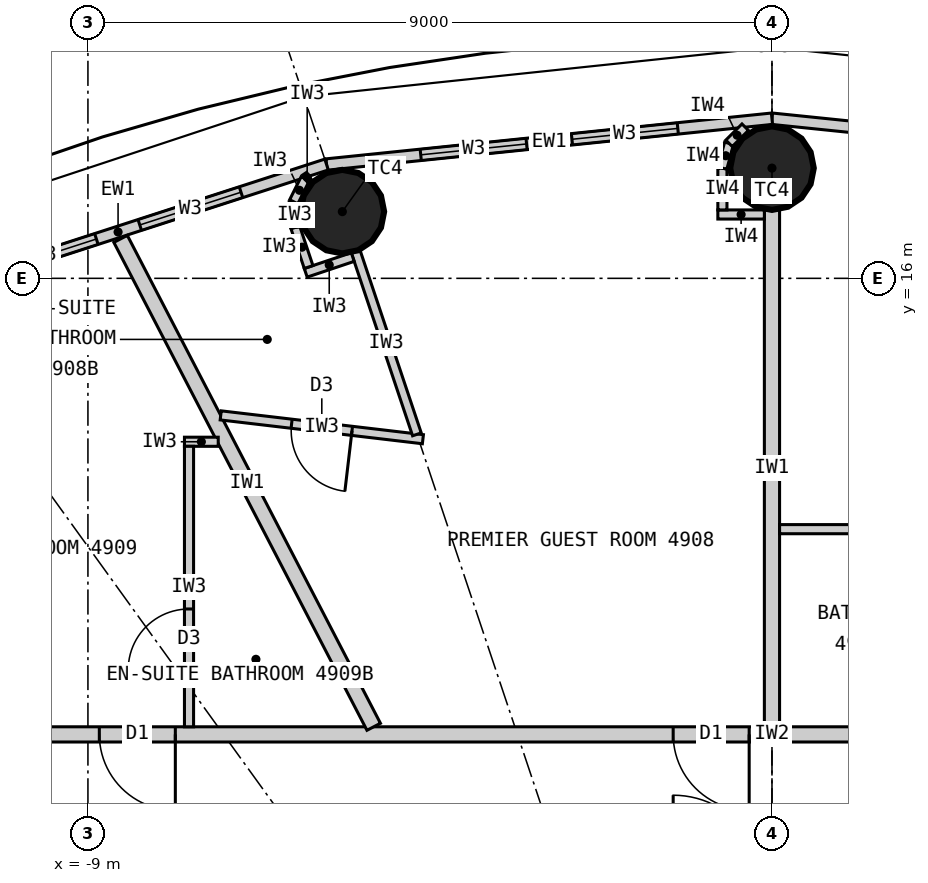
"""IFC4 building model, lengths in metres.
Left out: names, types, materials, properties, quantities, classifications, styles, units other than length and angle.
Written with IfcOpenShell. Run it as: python <this file> out.ifc"""

import sys

from ifc_helpers import new_model, si_unit, direction, frame, frame_2d, origin, origin_2d, place, context, subcontext, project, spatial, rectangle, circle, extrude, clip, halfspace, element, fill, save


model = new_model("IFC4")
c1 = context("Model", 3, precision=1e-05, world=origin(), true_north=direction((0.0, 1.0)))
c2 = subcontext(c1, "Body", "Model", "MODEL_VIEW")
j1 = project(units=[si_unit("LENGTHUNIT", "METRE"), si_unit("PLANEANGLEUNIT", "RADIAN")], contexts=[c1])
p1 = place(None, origin())
s1 = spatial("IfcSite", under=j1, at=p1, CompositionType="ELEMENT")
p2 = place(p1, origin())
s2 = spatial("IfcBuilding", under=s1, at=p2, CompositionType="ELEMENT")
p3 = place(p2, frame((0.0, 0.0, 183.0)))
s3 = spatial("IfcBuildingStorey", under=s2, at=p3, CompositionType="ELEMENT", Elevation=183.0)
for number, where, z_axis, x_axis in (
    (1, (0.0, 17.45, 0.0), (0.0, 0.0, 1.0), (1.0, 0.0, 0.0)),
    (2, (-5.653, 16.877, 0.0), (0.0, 0.0, 1.0), (1.0, 0.0, 0.0)),
):
    element("IfcColumn", number, at=place(p3, frame(where, z_axis=z_axis, x_axis=x_axis)), inside=s3, PredefinedType="COLUMN", context=c2, shape_type="Clipping", body=[
        clip(extrude(circle(Radius=0.55, at=origin_2d()), origin(), (0.0, 0.0, 1.0), 3.3), halfspace(frame((0.0, 0.0, 2.25), z_axis=(0.0, 0.0, 1.0), x_axis=(1.0, 0.0, 0.0)), False)),
    ])
p4 = place(p3, frame((5.86, 17.497, 0.0), z_axis=(0.0, 0.0, 1.0), x_axis=(-0.994751738032, 0.102318032045, 0.0)))
e3 = element("IfcWall", 3, at=p4, inside=s3, PredefinedType="ELEMENTEDWALL", context=c2, shape_type="SweptSolid", body=[
    extrude(rectangle(XDim=5.891, YDim=0.15, at=frame_2d((2.946, 0.0))), origin(), (0.0, 0.0, 1.0), 3.05),
])
p5 = place(p4, frame((1.246, 0.0, 0.9)))
e4 = element("IfcOpeningElement", 4, at=p5, cuts=e3, PredefinedType="OPENING", context=c2, shape_type="SweptSolid", body=[
    extrude(rectangle(XDim=1.4, YDim=1.9, at=frame_2d((0.7, 0.95))), frame((0.0, 0.085, 0.0), z_axis=(0.0, -1.0, 0.0), x_axis=(1.0, 0.0, 0.0)), (0.0, 0.0, 1.0), 0.17),
])
p6 = place(p4, frame((3.246, 0.0, 0.9)))
e5 = element("IfcOpeningElement", 5, at=p6, cuts=e3, PredefinedType="OPENING", context=c2, shape_type="SweptSolid", body=[
    extrude(rectangle(XDim=1.4, YDim=1.9, at=frame_2d((0.7, 0.95))), frame((0.0, 0.085, 0.0), z_axis=(0.0, -1.0, 0.0), x_axis=(1.0, 0.0, 0.0)), (0.0, 0.0, 1.0), 0.17),
])
p7 = place(p3, frame((0.0, 18.1, 0.0), z_axis=(0.0, 0.0, 1.0), x_axis=(-0.994751738032, -0.102318032045, 0.0)))
e6 = element("IfcWall", 6, at=p7, inside=s3, PredefinedType="ELEMENTEDWALL", context=c2, shape_type="SweptSolid", body=[
    extrude(rectangle(XDim=5.891, YDim=0.15, at=frame_2d((2.946, 0.0))), origin(), (0.0, 0.0, 1.0), 3.05),
])
p8 = place(p7, frame((1.246, 0.0, 0.9)))
e7 = element("IfcOpeningElement", 7, at=p8, cuts=e6, PredefinedType="OPENING", context=c2, shape_type="SweptSolid", body=[
    extrude(rectangle(XDim=1.4, YDim=1.9, at=frame_2d((0.7, 0.95))), frame((0.0, 0.085, 0.0), z_axis=(0.0, -1.0, 0.0), x_axis=(1.0, 0.0, 0.0)), (0.0, 0.0, 1.0), 0.17),
])
p9 = place(p7, frame((3.246, 0.0, 0.9)))
e8 = element("IfcOpeningElement", 8, at=p9, cuts=e6, PredefinedType="OPENING", context=c2, shape_type="SweptSolid", body=[
    extrude(rectangle(XDim=1.4, YDim=1.9, at=frame_2d((0.7, 0.95))), frame((0.0, 0.085, 0.0), z_axis=(0.0, -1.0, 0.0), x_axis=(1.0, 0.0, 0.0)), (0.0, 0.0, 1.0), 0.17),
])
p10 = place(p3, frame((-5.86, 17.497, 0.0), z_axis=(0.0, 0.0, 1.0), x_axis=(-0.951432482129, -0.307857486429, 0.0)))
e9 = element("IfcWall", 9, at=p10, inside=s3, PredefinedType="ELEMENTEDWALL", context=c2, shape_type="SweptSolid", body=[
    extrude(rectangle(XDim=5.766, YDim=0.15, at=frame_2d((2.883, 0.0))), origin(), (0.0, 0.0, 1.0), 3.05),
])
p11 = place(p10, frame((1.183, 0.0, 0.9)))
e10 = element("IfcOpeningElement", 10, at=p11, cuts=e9, PredefinedType="OPENING", context=c2, shape_type="SweptSolid", body=[
    extrude(rectangle(XDim=1.4, YDim=1.9, at=frame_2d((0.7, 0.95))), frame((0.0, 0.085, 0.0), z_axis=(0.0, -1.0, 0.0), x_axis=(1.0, 0.0, 0.0)), (0.0, 0.0, 1.0), 0.17),
])
p12 = place(p10, frame((3.183, 0.0, 0.9)))
e11 = element("IfcOpeningElement", 11, at=p12, cuts=e9, PredefinedType="OPENING", context=c2, shape_type="SweptSolid", body=[
    extrude(rectangle(XDim=1.4, YDim=1.9, at=frame_2d((0.7, 0.95))), frame((0.0, 0.085, 0.0), z_axis=(0.0, -1.0, 0.0), x_axis=(1.0, 0.0, 0.0)), (0.0, 0.0, 1.0), 0.17),
])
p13 = place(p3, frame((-14.1, 10.0, 0.0), z_axis=(0.0, 0.0, 1.0), x_axis=(1.0, 0.0, 0.0)))
e12 = element("IfcWall", 12, at=p13, inside=s3, PredefinedType="PARTITIONING", context=c2, shape_type="SweptSolid", body=[
    extrude(rectangle(XDim=28.2, YDim=0.2, at=frame_2d((14.1, 0.0))), origin(), (0.0, 0.0, 1.0), 3.05),
])
p14 = place(p13, frame((24.549, 0.0, 0.0)))
e13 = element("IfcOpeningElement", 13, at=p14, cuts=e12, PredefinedType="OPENING", context=c2, shape_type="SweptSolid", body=[
    extrude(rectangle(XDim=1.0, YDim=2.2, at=frame_2d((0.5, 1.1))), frame((0.0, 0.11, 0.0), z_axis=(0.0, -1.0, 0.0), x_axis=(1.0, 0.0, 0.0)), (0.0, 0.0, 1.0), 0.22),
])
p15 = place(p13, frame((18.829, 0.0, 0.0)))
e14 = element("IfcOpeningElement", 14, at=p15, cuts=e12, PredefinedType="OPENING", context=c2, shape_type="SweptSolid", body=[
    extrude(rectangle(XDim=1.0, YDim=2.2, at=frame_2d((0.5, 1.1))), frame((0.0, 0.11, 0.0), z_axis=(0.0, -1.0, 0.0), x_axis=(1.0, 0.0, 0.0)), (0.0, 0.0, 1.0), 0.22),
])
p16 = place(p13, frame((12.8, 0.0, 0.0)))
e15 = element("IfcOpeningElement", 15, at=p16, cuts=e12, PredefinedType="OPENING", context=c2, shape_type="SweptSolid", body=[
    extrude(rectangle(XDim=1.0, YDim=2.2, at=frame_2d((0.5, 1.1))), frame((0.0, 0.11, 0.0), z_axis=(0.0, -1.0, 0.0), x_axis=(1.0, 0.0, 0.0)), (0.0, 0.0, 1.0), 0.22),
])
p17 = place(p13, frame((5.25, 0.0, 0.0)))
e16 = element("IfcOpeningElement", 16, at=p17, cuts=e12, PredefinedType="OPENING", context=c2, shape_type="SweptSolid", body=[
    extrude(rectangle(XDim=1.0, YDim=2.2, at=frame_2d((0.5, 1.1))), frame((0.0, 0.11, 0.0), z_axis=(0.0, -1.0, 0.0), x_axis=(1.0, 0.0, 0.0)), (0.0, 0.0, 1.0), 0.22),
])
p18 = place(p3, frame((0.0, 10.1, 0.0), z_axis=(0.0, 0.0, 1.0), x_axis=(0.0, 1.0, 0.0)))
e17 = element("IfcWall", 17, at=p18, inside=s3, PredefinedType="PARTITIONING", context=c2, shape_type="SweptSolid", body=[
    extrude(rectangle(XDim=6.8, YDim=0.2, at=frame_2d((3.4, 0.0))), origin(), (0.0, 0.0, 1.0), 2.25),
])
p19 = place(p3, frame((-5.24, 10.1, 0.0), z_axis=(0.0, 0.0, 1.0), x_axis=(-0.460532965373, 0.887642601391, 0.0)))
e18 = element("IfcWall", 18, at=p19, inside=s3, PredefinedType="PARTITIONING", context=c2, shape_type="SweptSolid", body=[
    extrude(rectangle(XDim=7.231, YDim=0.2, at=frame_2d((3.616, 0.0))), origin(), (0.0, 0.0, 1.0), 3.05),
])
p20 = place(p3, frame((0.1, 12.7, 0.0), z_axis=(0.0, 0.0, 1.0), x_axis=(1.0, 0.0, 0.0)))
e19 = element("IfcWall", 19, at=p20, inside=s3, PredefinedType="PARTITIONING", context=c2, shape_type="SweptSolid", body=[
    extrude(rectangle(XDim=2.34, YDim=0.12, at=frame_2d((1.17, 0.0))), origin(), (0.0, 0.0, 1.0), 3.05),
])
p21 = place(p3, frame((-7.253, 14.197, 0.0), z_axis=(0.0, 0.0, 1.0), x_axis=(0.993128188393, -0.117031625725, 0.0)))
e20 = element("IfcWall", 20, at=p21, inside=s3, PredefinedType="PARTITIONING", context=c2, shape_type="SweptSolid", body=[
    extrude(rectangle(XDim=2.678, YDim=0.12, at=frame_2d((1.339, 0.0))), origin(), (0.0, 0.0, 1.0), 3.05),
])
p22 = place(p21, frame((0.939, 0.0, 0.0)))
e21 = element("IfcOpeningElement", 21, at=p22, cuts=e20, PredefinedType="OPENING", context=c2, shape_type="SweptSolid", body=[
    extrude(rectangle(XDim=0.8, YDim=2.1, at=frame_2d((0.4, 1.05))), frame((0.0, 0.07, 0.0), z_axis=(0.0, -1.0, 0.0), x_axis=(1.0, 0.0, 0.0)), (0.0, 0.0, 1.0), 0.14),
])
p23 = place(p3, frame((-4.671, 13.948, 0.0), z_axis=(0.0, 0.0, 1.0), x_axis=(-0.317669167093, 0.948201613729, 0.0)))
e22 = element("IfcWall", 22, at=p23, inside=s3, PredefinedType="PARTITIONING", context=c2, shape_type="SweptSolid", body=[
    extrude(rectangle(XDim=2.54, YDim=0.12, at=frame_2d((1.27, 0.0))), origin(), (0.0, 0.0, 1.0), 2.15),
])
p24 = place(p3, frame((-5.516, 16.28, 0.0), z_axis=(0.0, 0.0, 1.0), x_axis=(-0.948157944392, -0.317799484717, 0.0)))
e23 = element("IfcWall", 23, at=p24, inside=s3, PredefinedType="PARTITIONING", context=c2, shape_type="SweptSolid", body=[
    extrude(rectangle(XDim=0.652, YDim=0.12, at=frame_2d((0.326, 0.0))), origin(), (0.0, 0.0, 1.0), 3.05),
])
p25 = place(p3, frame((-6.097, 16.149, 0.0), z_axis=(0.0, 0.0, 1.0), x_axis=(-0.317292604854, 0.948327687514, 0.0)))
e24 = element("IfcWall", 24, at=p25, inside=s3, PredefinedType="PARTITIONING", context=c2, shape_type="SweptSolid", body=[
    extrude(rectangle(XDim=0.55, YDim=0.12, at=frame_2d((0.275, 0.0))), origin(), (0.0, 0.0, 1.0), 3.05),
])
for number, where, z_axis, x_axis in (
    (25, (-6.271, 16.67, 0.0), (0.0, 0.0, 1.0), (-0.061, 0.998, 0.0)),
    (26, (-6.292, 17.007, 0.0), (0.0, 0.0, 1.0), (0.445, 0.895, 0.0)),
):
    element("IfcWall", number, at=place(p3, frame(where, z_axis=z_axis, x_axis=x_axis)), inside=s3, PredefinedType="PARTITIONING", context=c2, shape_type="SweptSolid", body=[
        extrude(rectangle(XDim=0.338, YDim=0.12, at=frame_2d((0.169, 0.0))), origin(), (0.0, 0.0, 1.0), 3.05),
    ])
p26 = place(p3, frame((-6.142, 17.31, 0.0), z_axis=(0.0, 0.0, 1.0), x_axis=(0.835039693181, 0.550189704386, 0.0)))
e27 = element("IfcWall", 27, at=p26, inside=s3, PredefinedType="PARTITIONING", context=c2, shape_type="SweptSolid", body=[
    extrude(rectangle(XDim=0.062, YDim=0.12, at=frame_2d((0.031, 0.0))), origin(), (0.0, 0.0, 1.0), 3.05),
])
p27 = place(p3, frame((-7.286, 13.85, 0.0), z_axis=(0.0, 0.0, 1.0), x_axis=(-1.0, 0.0, 0.0)))
e28 = element("IfcWall", 28, at=p27, inside=s3, PredefinedType="PARTITIONING", context=c2, shape_type="SweptSolid", body=[
    extrude(rectangle(XDim=0.444, YDim=0.12, at=frame_2d((0.222, 0.0))), origin(), (0.0, 0.0, 1.0), 3.05),
])
p28 = place(p3, frame((-7.67, 10.1, 0.0), z_axis=(0.0, 0.0, 1.0), x_axis=(0.0, 1.0, 0.0)))
e29 = element("IfcWall", 29, at=p28, inside=s3, PredefinedType="PARTITIONING", context=c2, shape_type="SweptSolid", body=[
    extrude(rectangle(XDim=3.69, YDim=0.12, at=frame_2d((1.845, 0.0))), origin(), (0.0, 0.0, 1.0), 3.05),
])
p29 = place(p28, frame((0.75, 0.0, 0.0)))
e30 = element("IfcOpeningElement", 30, at=p29, cuts=e29, PredefinedType="OPENING", context=c2, shape_type="SweptSolid", body=[
    extrude(rectangle(XDim=0.8, YDim=2.1, at=frame_2d((0.4, 1.05))), frame((0.0, 0.07, 0.0), z_axis=(0.0, -1.0, 0.0), x_axis=(1.0, 0.0, 0.0)), (0.0, 0.0, 1.0), 0.14),
])
p30 = place(p3, frame((-0.1, 16.84, 0.0), z_axis=(0.0, 0.0, 1.0), x_axis=(-1.0, 0.0, 0.0)))
e31 = element("IfcWall", 31, at=p30, inside=s3, PredefinedType="PARTITIONING", context=c2, shape_type="SweptSolid", body=[
    extrude(rectangle(XDim=0.612, YDim=0.12, at=frame_2d((0.306, 0.0))), origin(), (0.0, 0.0, 1.0), 3.05),
])
p31 = place(p3, frame((-0.652, 16.9, 0.0), z_axis=(0.0, 0.0, 1.0), x_axis=(0.0, 1.0, 0.0)))
e32 = element("IfcWall", 32, at=p31, inside=s3, PredefinedType="PARTITIONING", context=c2, shape_type="SweptSolid", body=[
    extrude(rectangle(XDim=0.55, YDim=0.12, at=frame_2d((0.275, 0.0))), origin(), (0.0, 0.0, 1.0), 3.05),
])
p32 = place(p3, frame((-0.652, 17.45, 0.0), z_axis=(0.0, 0.0, 1.0), x_axis=(0.258832454679, 0.965922233104, 0.0)))
e33 = element("IfcWall", 33, at=p32, inside=s3, PredefinedType="PARTITIONING", context=c2, shape_type="SweptSolid", body=[
    extrude(rectangle(XDim=0.338, YDim=0.12, at=frame_2d((0.169, 0.0))), origin(), (0.0, 0.0, 1.0), 3.05),
])
p33 = place(p3, frame((-0.565, 17.776, 0.0), z_axis=(0.0, 0.0, 1.0), x_axis=(0.707106781187, 0.707106781187, 0.0)))
e34 = element("IfcWall", 34, at=p33, inside=s3, PredefinedType="PARTITIONING", context=c2, shape_type="SweptSolid", body=[
    extrude(rectangle(XDim=0.301, YDim=0.12, at=frame_2d((0.15, 0.0))), origin(), (0.0, 0.0, 1.0), 3.05),
])
p34 = place(p8, origin())
e35 = element("IfcWindow", 35, at=p34, inside=s3, PartitioningType="SINGLE_PANEL", PredefinedType="WINDOW", context=c2, shape_type="SweptSolid", body=[
    extrude(rectangle(XDim=1.4, YDim=1.9, at=frame_2d((0.7, 0.95))), frame((0.0, 0.03, 0.0), z_axis=(0.0, -1.0, 0.0), x_axis=(1.0, 0.0, 0.0)), (0.0, 0.0, 1.0), 0.06),
])
fill(e7, e35)
p35 = place(p9, origin())
e36 = element("IfcWindow", 36, at=p35, inside=s3, PartitioningType="SINGLE_PANEL", PredefinedType="WINDOW", context=c2, shape_type="SweptSolid", body=[
    extrude(rectangle(XDim=1.4, YDim=1.9, at=frame_2d((0.7, 0.95))), frame((0.0, 0.03, 0.0), z_axis=(0.0, -1.0, 0.0), x_axis=(1.0, 0.0, 0.0)), (0.0, 0.0, 1.0), 0.06),
])
fill(e8, e36)
p36 = place(p11, origin())
e37 = element("IfcWindow", 37, at=p36, inside=s3, PartitioningType="SINGLE_PANEL", PredefinedType="WINDOW", context=c2, shape_type="SweptSolid", body=[
    extrude(rectangle(XDim=1.4, YDim=1.9, at=frame_2d((0.7, 0.95))), frame((0.0, 0.03, 0.0), z_axis=(0.0, -1.0, 0.0), x_axis=(1.0, 0.0, 0.0)), (0.0, 0.0, 1.0), 0.06),
])
fill(e10, e37)
p37 = place(p12, origin())
e38 = element("IfcWindow", 38, at=p37, inside=s3, PartitioningType="SINGLE_PANEL", PredefinedType="WINDOW", context=c2, shape_type="SweptSolid", body=[
    extrude(rectangle(XDim=1.4, YDim=1.9, at=frame_2d((0.7, 0.95))), frame((0.0, 0.03, 0.0), z_axis=(0.0, -1.0, 0.0), x_axis=(1.0, 0.0, 0.0)), (0.0, 0.0, 1.0), 0.06),
])
fill(e11, e38)
p38 = place(p22, origin())
e39 = element("IfcDoor", 39, at=p38, inside=s3, OperationType="SINGLE_SWING_RIGHT", PredefinedType="DOOR", context=c2, shape_type="SweptSolid", body=[
    extrude(rectangle(XDim=0.8, YDim=2.1, at=frame_2d((0.4, 1.05))), frame((0.0, 0.025, 0.0), z_axis=(0.0, -1.0, 0.0), x_axis=(1.0, 0.0, 0.0)), (0.0, 0.0, 1.0), 0.05),
])
fill(e21, e39)
p39 = place(p16, origin())
e40 = element("IfcDoor", 40, at=p39, inside=s3, OperationType="SINGLE_SWING_RIGHT", PredefinedType="DOOR", context=c2, shape_type="SweptSolid", body=[
    extrude(rectangle(XDim=1.0, YDim=2.2, at=frame_2d((0.5, 1.1))), frame((0.0, 0.025, 0.0), z_axis=(0.0, -1.0, 0.0), x_axis=(1.0, 0.0, 0.0)), (0.0, 0.0, 1.0), 0.05),
])
fill(e15, e40)
p40 = place(p29, origin())
e41 = element("IfcDoor", 41, at=p40, inside=s3, OperationType="SINGLE_SWING_LEFT", PredefinedType="DOOR", context=c2, shape_type="SweptSolid", body=[
    extrude(rectangle(XDim=0.8, YDim=2.1, at=frame_2d((0.4, 1.05))), frame((0.0, 0.025, 0.0), z_axis=(0.0, -1.0, 0.0), x_axis=(1.0, 0.0, 0.0)), (0.0, 0.0, 1.0), 0.05),
])
fill(e30, e41)
p41 = place(p17, origin())
e42 = element("IfcDoor", 42, at=p41, inside=s3, OperationType="SINGLE_SWING_RIGHT", PredefinedType="DOOR", context=c2, shape_type="SweptSolid", body=[
    extrude(rectangle(XDim=1.0, YDim=2.2, at=frame_2d((0.5, 1.1))), frame((0.0, 0.025, 0.0), z_axis=(0.0, -1.0, 0.0), x_axis=(1.0, 0.0, 0.0)), (0.0, 0.0, 1.0), 0.05),
])
fill(e16, e42)
save(model, sys.argv[1])
